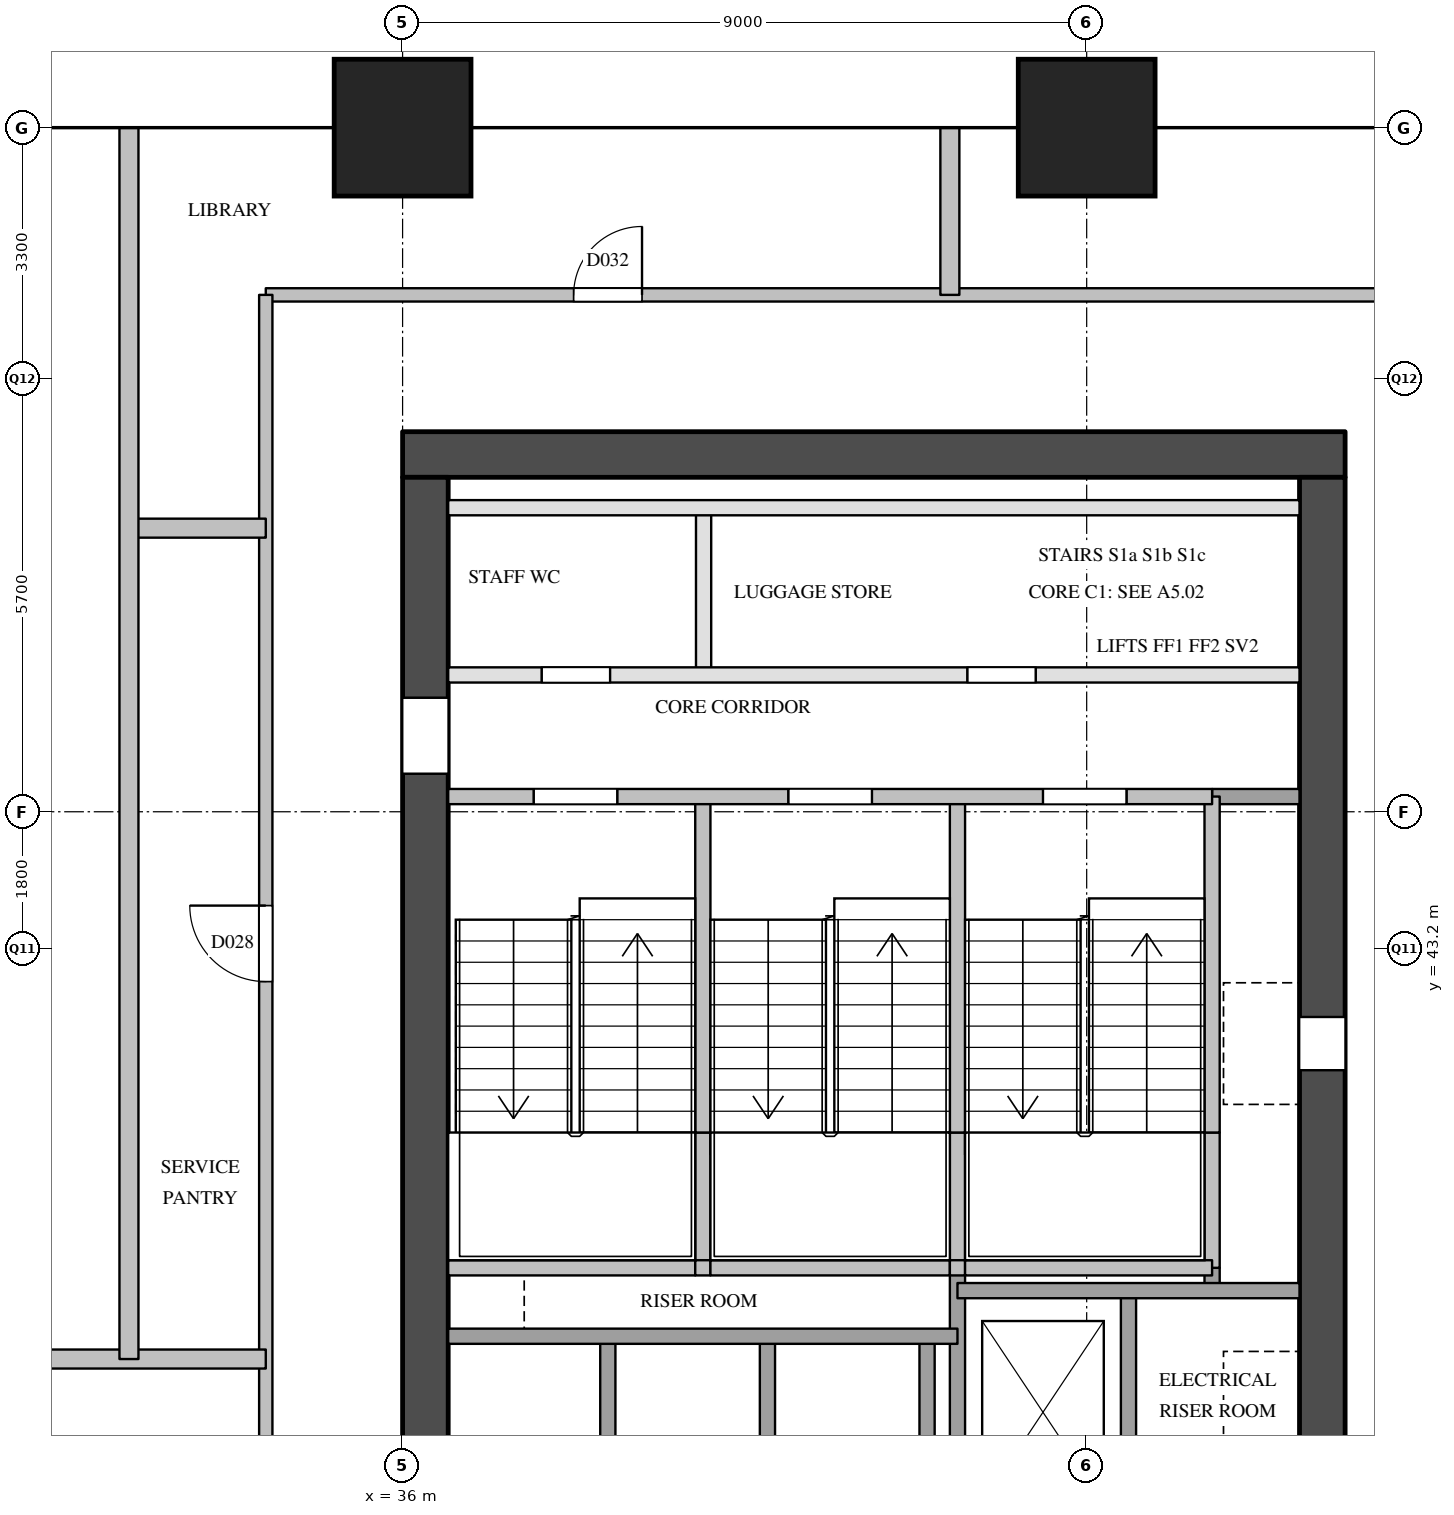
"""IFC4 building model, lengths in metres.
Left out: names, types, materials, properties, quantities, classifications, styles, units other than length and angle.
Written with IfcOpenShell. Run it as: python <this file> out.ifc"""

import sys

from ifc_helpers import new_model, si_unit, direction, frame, frame_2d, origin, origin_2d, place, context, subcontext, project, spatial, rectangle, extrude, element, fill, save


model = new_model("IFC4")
c1 = context("Model", 3, precision=1e-05, world=origin(), true_north=direction((0.0, 1.0)))
c2 = subcontext(c1, "Body", "Model", "MODEL_VIEW")
j1 = project(units=[si_unit("LENGTHUNIT", "METRE"), si_unit("PLANEANGLEUNIT", "RADIAN")], contexts=[c1])
p1 = place(None, origin())
s1 = spatial("IfcSite", under=j1, at=p1, CompositionType="ELEMENT")
p2 = place(p1, origin())
s2 = spatial("IfcBuilding", under=s1, at=p2, CompositionType="ELEMENT")
p3 = place(p2, frame((0.0, 0.0, 31.0)))
s3 = spatial("IfcBuildingStorey", under=s2, at=p3, CompositionType="ELEMENT", Elevation=31.0)
for number, where, z_axis, x_axis in (
    (1, (36.0, 54.0, 0.0), (0.0, 0.0, 1.0), (1.0, 0.0, 0.0)),
    (2, (45.0, 54.0, 0.0), (0.0, 0.0, 1.0), (1.0, 0.0, 0.0)),
):
    element("IfcColumn", number, at=place(p3, frame(where, z_axis=z_axis, x_axis=x_axis)), inside=s3, PredefinedType="COLUMN", context=c2, shape_type="SweptSolid", body=[
        extrude(rectangle(XDim=1.8, YDim=1.8, at=origin_2d()), origin(), (0.0, 0.0, 1.0), 3.8),
    ])
p4 = place(p3, frame((36.0, 49.7, 0.0), z_axis=(0.0, 0.0, 1.0), x_axis=(1.0, 0.0, 0.0)))
e3 = element("IfcWall", 3, at=p4, inside=s3, PredefinedType="SHEAR", context=c2, shape_type="SweptSolid", body=[
    extrude(rectangle(XDim=12.4, YDim=0.6, at=frame_2d((6.2, 0.0))), origin(), (0.0, 0.0, 1.0), 3.5),
])
p5 = place(p3, frame((36.3, 29.1, 0.0), z_axis=(0.0, 0.0, 1.0), x_axis=(0.0, 1.0, 0.0)))
e4 = element("IfcWall", 4, at=p5, inside=s3, PredefinedType="SHEAR", context=c2, shape_type="SweptSolid", body=[
    extrude(rectangle(XDim=20.3, YDim=0.6, at=frame_2d((10.15, 0.0))), origin(), (0.0, 0.0, 1.0), 3.5),
])
p6 = place(p5, frame((3.6, 0.0, 0.0)))
e5 = element("IfcOpeningElement", 5, at=p6, cuts=e4, PredefinedType="OPENING", context=c2, shape_type="SweptSolid", body=[
    extrude(rectangle(XDim=1.8, YDim=2.1, at=frame_2d((0.9, 1.05))), frame((0.0, 0.31, 0.0), z_axis=(0.0, -1.0, 0.0), x_axis=(1.0, 0.0, 0.0)), (0.0, 0.0, 1.0), 0.62),
])
p7 = place(p5, frame((16.4, 0.0, 0.0)))
e6 = element("IfcOpeningElement", 6, at=p7, cuts=e4, PredefinedType="OPENING", context=c2, shape_type="SweptSolid", body=[
    extrude(rectangle(XDim=1.0, YDim=2.1, at=frame_2d((0.5, 1.05))), frame((0.0, 0.31, 0.0), z_axis=(0.0, -1.0, 0.0), x_axis=(1.0, 0.0, 0.0)), (0.0, 0.0, 1.0), 0.62),
])
p8 = place(p3, frame((48.1, 29.1, 0.0), z_axis=(0.0, 0.0, 1.0), x_axis=(0.0, 1.0, 0.0)))
e7 = element("IfcWall", 7, at=p8, inside=s3, PredefinedType="SHEAR", context=c2, shape_type="SweptSolid", body=[
    extrude(rectangle(XDim=20.3, YDim=0.6, at=frame_2d((10.15, 0.0))), origin(), (0.0, 0.0, 1.0), 3.5),
])
p9 = place(p8, frame((12.5, 0.0, 0.0)))
e8 = element("IfcOpeningElement", 8, at=p9, cuts=e7, PredefinedType="OPENING", context=c2, shape_type="SweptSolid", body=[
    extrude(rectangle(XDim=0.7, YDim=2.1, at=frame_2d((0.35, 1.05))), frame((0.0, 0.31, 0.0), z_axis=(0.0, -1.0, 0.0), x_axis=(1.0, 0.0, 0.0)), (0.0, 0.0, 1.0), 0.62),
])
p10 = place(p8, frame((3.9, 0.0, 0.0)))
e9 = element("IfcOpeningElement", 9, at=p10, cuts=e7, PredefinedType="OPENING", context=c2, shape_type="SweptSolid", body=[
    extrude(rectangle(XDim=1.8, YDim=2.1, at=frame_2d((0.9, 1.05))), frame((0.0, 0.31, 0.0), z_axis=(0.0, -1.0, 0.0), x_axis=(1.0, 0.0, 0.0)), (0.0, 0.0, 1.0), 0.62),
])
p11 = place(p3, frame((38.7, 34.9, 0.0), z_axis=(0.0, 0.0, 1.0), x_axis=(0.0, 1.0, 0.0)))
e10 = element("IfcWall", 10, at=p11, inside=s3, PredefinedType="SOLIDWALL", context=c2, shape_type="SweptSolid", body=[
    extrude(rectangle(XDim=3.2, YDim=0.2, at=frame_2d((1.6, 0.0))), origin(), (0.0, 0.0, 1.0), 3.5),
])
p12 = place(p3, frame((39.95, 39.0, 0.0), z_axis=(0.0, 0.0, 1.0), x_axis=(0.0, 1.0, 0.0)))
e11 = element("IfcWall", 11, at=p12, inside=s3, PredefinedType="SOLIDWALL", context=c2, shape_type="SweptSolid", body=[
    extrude(rectangle(XDim=1.78, YDim=0.2, at=frame_2d((0.89, 0.0))), origin(), (0.0, 0.0, 1.0), 3.5),
])
p13 = place(p3, frame((39.95, 40.78, 0.0), z_axis=(0.0, 0.0, 1.0), x_axis=(0.0, 1.0, 0.0)))
e12 = element("IfcWall", 12, at=p13, inside=s3, PredefinedType="SOLIDWALL", context=c2, shape_type="SweptSolid", body=[
    extrude(rectangle(XDim=4.42, YDim=0.2, at=frame_2d((2.21, 0.0))), origin(), (0.0, 0.0, 1.0), 3.5),
])
p14 = place(p3, frame((39.96, 46.8, 0.0), z_axis=(0.0, 0.0, 1.0), x_axis=(0.0, 1.0, 0.0)))
e13 = element("IfcWall", 13, at=p14, inside=s3, PredefinedType="PARTITIONING", context=c2, shape_type="SweptSolid", body=[
    extrude(rectangle(XDim=2.2, YDim=0.2, at=frame_2d((1.1, 0.0))), origin(), (0.0, 0.0, 1.0), 3.5),
])
for number, where, z_axis, x_axis in (
    (14, (40.8, 34.9, 0.0), (0.0, 0.0, 1.0), (0.0, 1.0, 0.0)),
    (15, (42.9, 34.9, 0.0), (0.0, 0.0, 1.0), (0.0, 1.0, 0.0)),
):
    element("IfcWall", number, at=place(p3, frame(where, z_axis=z_axis, x_axis=x_axis)), inside=s3, PredefinedType="SOLIDWALL", context=c2, shape_type="SweptSolid", body=[
        extrude(rectangle(XDim=3.2, YDim=0.2, at=frame_2d((1.6, 0.0))), origin(), (0.0, 0.0, 1.0), 3.5),
    ])
p15 = place(p3, frame((43.3, 29.1, 0.0), z_axis=(0.0, 0.0, 1.0), x_axis=(0.0, 1.0, 0.0)))
e16 = element("IfcWall", 16, at=p15, inside=s3, PredefinedType="SOLIDWALL", context=c2, shape_type="SweptSolid", body=[
    extrude(rectangle(XDim=9.9, YDim=0.2, at=frame_2d((4.95, 0.0))), origin(), (0.0, 0.0, 1.0), 3.5),
])
p16 = place(p3, frame((43.3, 39.0, 0.0), z_axis=(0.0, 0.0, 1.0), x_axis=(0.0, 1.0, 0.0)))
e17 = element("IfcWall", 17, at=p16, inside=s3, PredefinedType="SOLIDWALL", context=c2, shape_type="SweptSolid", body=[
    extrude(rectangle(XDim=1.78, YDim=0.2, at=frame_2d((0.89, 0.0))), origin(), (0.0, 0.0, 1.0), 3.5),
])
p17 = place(p3, frame((43.3, 40.78, 0.0), z_axis=(0.0, 0.0, 1.0), x_axis=(0.0, 1.0, 0.0)))
e18 = element("IfcWall", 18, at=p17, inside=s3, PredefinedType="SOLIDWALL", context=c2, shape_type="SweptSolid", body=[
    extrude(rectangle(XDim=4.42, YDim=0.2, at=frame_2d((2.21, 0.0))), origin(), (0.0, 0.0, 1.0), 3.5),
])
p18 = place(p3, frame((45.55, 35.5, 0.0), z_axis=(0.0, 0.0, 1.0), x_axis=(0.0, 1.0, 0.0)))
e19 = element("IfcWall", 19, at=p18, inside=s3, PredefinedType="SOLIDWALL", context=c2, shape_type="SweptSolid", body=[
    extrude(rectangle(XDim=3.2, YDim=0.2, at=frame_2d((1.6, 0.0))), origin(), (0.0, 0.0, 1.0), 3.5),
])
p19 = place(p3, frame((46.65, 38.7, 0.0), z_axis=(0.0, 0.0, 1.0), x_axis=(0.0, 1.0, 0.0)))
e20 = element("IfcWall", 20, at=p19, inside=s3, PredefinedType="SOLIDWALL", context=c2, shape_type="SweptSolid", body=[
    extrude(rectangle(XDim=0.3, YDim=0.2, at=frame_2d((0.15, 0.0))), origin(), (0.0, 0.0, 1.0), 3.5),
])
p20 = place(p3, frame((46.65, 39.0, 0.0), z_axis=(0.0, 0.0, 1.0), x_axis=(0.0, 1.0, 0.0)))
e21 = element("IfcWall", 21, at=p20, inside=s3, PredefinedType="SOLIDWALL", context=c2, shape_type="SweptSolid", body=[
    extrude(rectangle(XDim=1.78, YDim=0.2, at=frame_2d((0.89, 0.0))), origin(), (0.0, 0.0, 1.0), 3.5),
])
p21 = place(p3, frame((46.65, 40.78, 0.0), z_axis=(0.0, 0.0, 1.0), x_axis=(0.0, 1.0, 0.0)))
e22 = element("IfcWall", 22, at=p21, inside=s3, PredefinedType="SOLIDWALL", context=c2, shape_type="SweptSolid", body=[
    extrude(rectangle(XDim=4.42, YDim=0.2, at=frame_2d((2.21, 0.0))), origin(), (0.0, 0.0, 1.0), 3.5),
])
p22 = place(p3, frame((36.6, 38.1, 0.0), z_axis=(0.0, 0.0, 1.0), x_axis=(1.0, 0.0, 0.0)))
e23 = element("IfcWall", 23, at=p22, inside=s3, PredefinedType="SOLIDWALL", context=c2, shape_type="SweptSolid", body=[
    extrude(rectangle(XDim=6.7, YDim=0.2, at=frame_2d((3.35, 0.0))), origin(), (0.0, 0.0, 1.0), 3.5),
])
p23 = place(p3, frame((43.3, 38.7, 0.0), z_axis=(0.0, 0.0, 1.0), x_axis=(1.0, 0.0, 0.0)))
e24 = element("IfcWall", 24, at=p23, inside=s3, PredefinedType="SOLIDWALL", context=c2, shape_type="SweptSolid", body=[
    extrude(rectangle(XDim=4.5, YDim=0.2, at=frame_2d((2.25, 0.0))), origin(), (0.0, 0.0, 1.0), 3.5),
])
p24 = place(p3, frame((36.6, 39.0, 0.0), z_axis=(0.0, 0.0, 1.0), x_axis=(1.0, 0.0, 0.0)))
e25 = element("IfcWall", 25, at=p24, inside=s3, PredefinedType="SOLIDWALL", context=c2, shape_type="SweptSolid", body=[
    extrude(rectangle(XDim=3.25, YDim=0.2, at=frame_2d((1.625, 0.0))), origin(), (0.0, 0.0, 1.0), 3.5),
])
p25 = place(p3, frame((39.85, 39.0, 0.0), z_axis=(0.0, 0.0, 1.0), x_axis=(1.0, 0.0, 0.0)))
e26 = element("IfcWall", 26, at=p25, inside=s3, PredefinedType="SOLIDWALL", context=c2, shape_type="SweptSolid", body=[
    extrude(rectangle(XDim=0.2, YDim=0.2, at=frame_2d((0.1, 0.0))), origin(), (0.0, 0.0, 1.0), 3.5),
])
p26 = place(p3, frame((40.05, 39.0, 0.0), z_axis=(0.0, 0.0, 1.0), x_axis=(1.0, 0.0, 0.0)))
e27 = element("IfcWall", 27, at=p26, inside=s3, PredefinedType="SOLIDWALL", context=c2, shape_type="SweptSolid", body=[
    extrude(rectangle(XDim=3.15, YDim=0.2, at=frame_2d((1.575, 0.0))), origin(), (0.0, 0.0, 1.0), 3.5),
])
p27 = place(p3, frame((43.2, 39.0, 0.0), z_axis=(0.0, 0.0, 1.0), x_axis=(1.0, 0.0, 0.0)))
e28 = element("IfcWall", 28, at=p27, inside=s3, PredefinedType="SOLIDWALL", context=c2, shape_type="SweptSolid", body=[
    extrude(rectangle(XDim=0.2, YDim=0.2, at=frame_2d((0.1, 0.0))), origin(), (0.0, 0.0, 1.0), 3.5),
])
p28 = place(p3, frame((43.4, 39.0, 0.0), z_axis=(0.0, 0.0, 1.0), x_axis=(1.0, 0.0, 0.0)))
e29 = element("IfcWall", 29, at=p28, inside=s3, PredefinedType="SOLIDWALL", context=c2, shape_type="SweptSolid", body=[
    extrude(rectangle(XDim=3.25, YDim=0.2, at=frame_2d((1.625, 0.0))), origin(), (0.0, 0.0, 1.0), 3.5),
])
p29 = place(p3, frame((46.65, 45.2, 0.0), z_axis=(0.0, 0.0, 1.0), x_axis=(1.0, 0.0, 0.0)))
e30 = element("IfcWall", 30, at=p29, inside=s3, PredefinedType="SOLIDWALL", context=c2, shape_type="SweptSolid", body=[
    extrude(rectangle(XDim=1.15, YDim=0.2, at=frame_2d((0.575, 0.0))), origin(), (0.0, 0.0, 1.0), 3.5),
])
p30 = place(p3, frame((36.6, 45.2, 0.0), z_axis=(0.0, 0.0, 1.0), x_axis=(1.0, 0.0, 0.0)))
e31 = element("IfcWall", 31, at=p30, inside=s3, PredefinedType="SOLIDWALL", context=c2, shape_type="SweptSolid", body=[
    extrude(rectangle(XDim=10.05, YDim=0.2, at=frame_2d((5.025, 0.0))), origin(), (0.0, 0.0, 1.0), 3.5),
])
p31 = place(p30, frame((1.125, 0.0, 0.0)))
e32 = element("IfcOpeningElement", 32, at=p31, cuts=e31, PredefinedType="OPENING", context=c2, shape_type="SweptSolid", body=[
    extrude(rectangle(XDim=1.1, YDim=2.1, at=frame_2d((0.55, 1.05))), frame((0.0, 0.11, 0.0), z_axis=(0.0, -1.0, 0.0), x_axis=(1.0, 0.0, 0.0)), (0.0, 0.0, 1.0), 0.22),
])
p32 = place(p30, frame((4.475, 0.0, 0.0)))
e33 = element("IfcOpeningElement", 33, at=p32, cuts=e31, PredefinedType="OPENING", context=c2, shape_type="SweptSolid", body=[
    extrude(rectangle(XDim=1.1, YDim=2.1, at=frame_2d((0.55, 1.05))), frame((0.0, 0.11, 0.0), z_axis=(0.0, -1.0, 0.0), x_axis=(1.0, 0.0, 0.0)), (0.0, 0.0, 1.0), 0.22),
])
p33 = place(p30, frame((7.825, 0.0, 0.0)))
e34 = element("IfcOpeningElement", 34, at=p33, cuts=e31, PredefinedType="OPENING", context=c2, shape_type="SweptSolid", body=[
    extrude(rectangle(XDim=1.1, YDim=2.1, at=frame_2d((0.55, 1.05))), frame((0.0, 0.11, 0.0), z_axis=(0.0, -1.0, 0.0), x_axis=(1.0, 0.0, 0.0)), (0.0, 0.0, 1.0), 0.22),
])
p34 = place(p3, frame((36.6, 46.8, 0.0), z_axis=(0.0, 0.0, 1.0), x_axis=(1.0, 0.0, 0.0)))
e35 = element("IfcWall", 35, at=p34, inside=s3, PredefinedType="PARTITIONING", context=c2, shape_type="SweptSolid", body=[
    extrude(rectangle(XDim=11.2, YDim=0.2, at=frame_2d((5.6, 0.0))), origin(), (0.0, 0.0, 1.0), 3.5),
])
p35 = place(p34, frame((1.23, 0.0, 0.0)))
e36 = element("IfcOpeningElement", 36, at=p35, cuts=e35, PredefinedType="OPENING", context=c2, shape_type="SweptSolid", body=[
    extrude(rectangle(XDim=0.9, YDim=2.1, at=frame_2d((0.45, 1.05))), frame((0.0, 0.11, 0.0), z_axis=(0.0, -1.0, 0.0), x_axis=(1.0, 0.0, 0.0)), (0.0, 0.0, 1.0), 0.22),
])
p36 = place(p34, frame((6.83, 0.0, 0.0)))
e37 = element("IfcOpeningElement", 37, at=p36, cuts=e35, PredefinedType="OPENING", context=c2, shape_type="SweptSolid", body=[
    extrude(rectangle(XDim=0.9, YDim=2.1, at=frame_2d((0.45, 1.05))), frame((0.0, 0.11, 0.0), z_axis=(0.0, -1.0, 0.0), x_axis=(1.0, 0.0, 0.0)), (0.0, 0.0, 1.0), 0.22),
])
p37 = place(p3, frame((36.6, 49.0, 0.0), z_axis=(0.0, 0.0, 1.0), x_axis=(1.0, 0.0, 0.0)))
e38 = element("IfcWall", 38, at=p37, inside=s3, PredefinedType="PARTITIONING", context=c2, shape_type="SweptSolid", body=[
    extrude(rectangle(XDim=11.2, YDim=0.2, at=frame_2d((5.6, 0.0))), origin(), (0.0, 0.0, 1.0), 3.5),
])
p38 = place(p3, frame((34.2, 51.8, 0.0), z_axis=(0.0, 0.0, 1.0), x_axis=(1.0, 0.0, 0.0)))
e39 = element("IfcWall", 39, at=p38, inside=s3, PredefinedType="PARTITIONING", context=c2, shape_type="SweptSolid", body=[
    extrude(rectangle(XDim=16.0, YDim=0.175, at=frame_2d((8.0, 0.0))), origin(), (0.0, 0.0, 1.0), 3.5),
])
p39 = place(p38, frame((4.05, 0.0, 0.0)))
e40 = element("IfcOpeningElement", 40, at=p39, cuts=e39, PredefinedType="OPENING", context=c2, shape_type="SweptSolid", body=[
    extrude(rectangle(XDim=0.9, YDim=2.1, at=frame_2d((0.45, 1.05))), frame((0.0, 0.097, 0.0), z_axis=(0.0, -1.0, 0.0), x_axis=(1.0, 0.0, 0.0)), (0.0, 0.0, 1.0), 0.195),
])
p40 = place(p3, frame((34.2, 29.12, 0.0), z_axis=(0.0, 0.0, 1.0), x_axis=(0.0, 1.0, 0.0)))
e41 = element("IfcWall", 41, at=p40, inside=s3, PredefinedType="PARTITIONING", context=c2, shape_type="SweptSolid", body=[
    extrude(rectangle(XDim=22.68, YDim=0.175, at=frame_2d((11.34, 0.0))), origin(), (0.0, 0.0, 1.0), 3.5),
])
p41 = place(p40, frame((3.84, 0.0, 0.0)))
e42 = element("IfcOpeningElement", 42, at=p41, cuts=e41, PredefinedType="OPENING", context=c2, shape_type="SweptSolid", body=[
    extrude(rectangle(XDim=1.0, YDim=2.1, at=frame_2d((0.5, 1.05))), frame((0.0, 0.097, 0.0), z_axis=(0.0, -1.0, 0.0), x_axis=(1.0, 0.0, 0.0)), (0.0, 0.0, 1.0), 0.195),
])
p42 = place(p40, frame((13.646, 0.0, 0.0)))
e43 = element("IfcOpeningElement", 43, at=p42, cuts=e41, PredefinedType="OPENING", context=c2, shape_type="SweptSolid", body=[
    extrude(rectangle(XDim=1.0, YDim=2.1, at=frame_2d((0.5, 1.05))), frame((0.0, 0.097, 0.0), z_axis=(0.0, -1.0, 0.0), x_axis=(1.0, 0.0, 0.0)), (0.0, 0.0, 1.0), 0.195),
])
p43 = place(p3, frame((27.125, 37.8, 0.0), z_axis=(0.0, 0.0, 1.0), x_axis=(1.0, 0.0, 0.0)))
e44 = element("IfcWall", 44, at=p43, inside=s3, PredefinedType="PARTITIONING", context=c2, shape_type="SweptSolid", body=[
    extrude(rectangle(XDim=7.075, YDim=0.25, at=frame_2d((3.538, 0.0))), origin(), (0.0, 0.0, 1.0), 2.5),
])
p44 = place(p3, frame((32.4, 48.731, 0.0), z_axis=(0.0, 0.0, 1.0), x_axis=(1.0, 0.0, 0.0)))
e45 = element("IfcWall", 45, at=p44, inside=s3, PredefinedType="PARTITIONING", context=c2, shape_type="SweptSolid", body=[
    extrude(rectangle(XDim=1.8, YDim=0.25, at=frame_2d((0.9, 0.0))), origin(), (0.0, 0.0, 1.0), 3.5),
])
p45 = place(p3, frame((32.4, 37.8, 0.0), z_axis=(0.0, 0.0, 1.0), x_axis=(0.0, 1.0, 0.0)))
e46 = element("IfcWall", 46, at=p45, inside=s3, PredefinedType="PARTITIONING", context=c2, shape_type="SweptSolid", body=[
    extrude(rectangle(XDim=16.2, YDim=0.25, at=frame_2d((8.1, 0.0))), origin(), (0.0, 0.0, 1.0), 2.5),
])
p46 = place(p3, frame((43.2, 51.8, 0.0), z_axis=(0.0, 0.0, 1.0), x_axis=(0.0, 1.0, 0.0)))
e47 = element("IfcWall", 47, at=p46, inside=s3, PredefinedType="PARTITIONING", context=c2, shape_type="SweptSolid", body=[
    extrude(rectangle(XDim=2.2, YDim=0.25, at=frame_2d((1.1, 0.0))), origin(), (0.0, 0.0, 1.0), 2.5),
])
p47 = place(p31, origin())
e48 = element("IfcDoor", 48, at=p47, inside=s3, OperationType="SINGLE_SWING_LEFT", PredefinedType="DOOR", context=c2, shape_type="SweptSolid", body=[
    extrude(rectangle(XDim=1.1, YDim=2.1, at=frame_2d((0.55, 1.05))), frame((0.0, 0.025, 0.0), z_axis=(0.0, -1.0, 0.0), x_axis=(1.0, 0.0, 0.0)), (0.0, 0.0, 1.0), 0.05),
])
fill(e32, e48)
p48 = place(p32, origin())
e49 = element("IfcDoor", 49, at=p48, inside=s3, OperationType="SINGLE_SWING_RIGHT", PredefinedType="DOOR", context=c2, shape_type="SweptSolid", body=[
    extrude(rectangle(XDim=1.1, YDim=2.1, at=frame_2d((0.55, 1.05))), frame((0.0, 0.025, 0.0), z_axis=(0.0, -1.0, 0.0), x_axis=(1.0, 0.0, 0.0)), (0.0, 0.0, 1.0), 0.05),
])
fill(e33, e49)
p49 = place(p33, origin())
e50 = element("IfcDoor", 50, at=p49, inside=s3, OperationType="SINGLE_SWING_RIGHT", PredefinedType="DOOR", context=c2, shape_type="SweptSolid", body=[
    extrude(rectangle(XDim=1.1, YDim=2.1, at=frame_2d((0.55, 1.05))), frame((0.0, 0.025, 0.0), z_axis=(0.0, -1.0, 0.0), x_axis=(1.0, 0.0, 0.0)), (0.0, 0.0, 1.0), 0.05),
])
fill(e34, e50)
p50 = place(p9, origin())
e51 = element("IfcDoor", 51, at=p50, inside=s3, OperationType="SINGLE_SWING_RIGHT", PredefinedType="DOOR", context=c2, shape_type="SweptSolid", body=[
    extrude(rectangle(XDim=0.7, YDim=2.1, at=frame_2d((0.35, 1.05))), frame((0.0, 0.025, 0.0), z_axis=(0.0, -1.0, 0.0), x_axis=(1.0, 0.0, 0.0)), (0.0, 0.0, 1.0), 0.05),
])
fill(e8, e51)
p51 = place(p7, origin())
e52 = element("IfcDoor", 52, at=p51, inside=s3, OperationType="SINGLE_SWING_RIGHT", PredefinedType="DOOR", context=c2, shape_type="SweptSolid", body=[
    extrude(rectangle(XDim=1.0, YDim=2.1, at=frame_2d((0.5, 1.05))), frame((0.0, 0.025, 0.0), z_axis=(0.0, -1.0, 0.0), x_axis=(1.0, 0.0, 0.0)), (0.0, 0.0, 1.0), 0.05),
])
fill(e6, e52)
p52 = place(p35, origin())
e53 = element("IfcDoor", 53, at=p52, inside=s3, OperationType="SINGLE_SWING_LEFT", PredefinedType="DOOR", context=c2, shape_type="SweptSolid", body=[
    extrude(rectangle(XDim=0.9, YDim=2.1, at=frame_2d((0.45, 1.05))), frame((0.0, 0.025, 0.0), z_axis=(0.0, -1.0, 0.0), x_axis=(1.0, 0.0, 0.0)), (0.0, 0.0, 1.0), 0.05),
])
fill(e36, e53)
p53 = place(p36, origin())
e54 = element("IfcDoor", 54, at=p53, inside=s3, OperationType="SINGLE_SWING_RIGHT", PredefinedType="DOOR", context=c2, shape_type="SweptSolid", body=[
    extrude(rectangle(XDim=0.9, YDim=2.1, at=frame_2d((0.45, 1.05))), frame((0.0, 0.025, 0.0), z_axis=(0.0, -1.0, 0.0), x_axis=(1.0, 0.0, 0.0)), (0.0, 0.0, 1.0), 0.05),
])
fill(e37, e54)
p54 = place(p42, origin())
e55 = element("IfcDoor", 55, at=p54, inside=s3, OperationType="SINGLE_SWING_RIGHT", PredefinedType="DOOR", context=c2, shape_type="SweptSolid", body=[
    extrude(rectangle(XDim=1.0, YDim=2.1, at=frame_2d((0.5, 1.05))), frame((0.0, 0.025, 0.0), z_axis=(0.0, -1.0, 0.0), x_axis=(1.0, 0.0, 0.0)), (0.0, 0.0, 1.0), 0.05),
])
fill(e43, e55)
p55 = place(p39, origin())
e56 = element("IfcDoor", 56, at=p55, inside=s3, OperationType="SINGLE_SWING_RIGHT", PredefinedType="DOOR", context=c2, shape_type="SweptSolid", body=[
    extrude(rectangle(XDim=0.9, YDim=2.1, at=frame_2d((0.45, 1.05))), frame((0.0, 0.025, 0.0), z_axis=(0.0, -1.0, 0.0), x_axis=(1.0, 0.0, 0.0)), (0.0, 0.0, 1.0), 0.05),
])
fill(e40, e56)
save(model, sys.argv[1])
